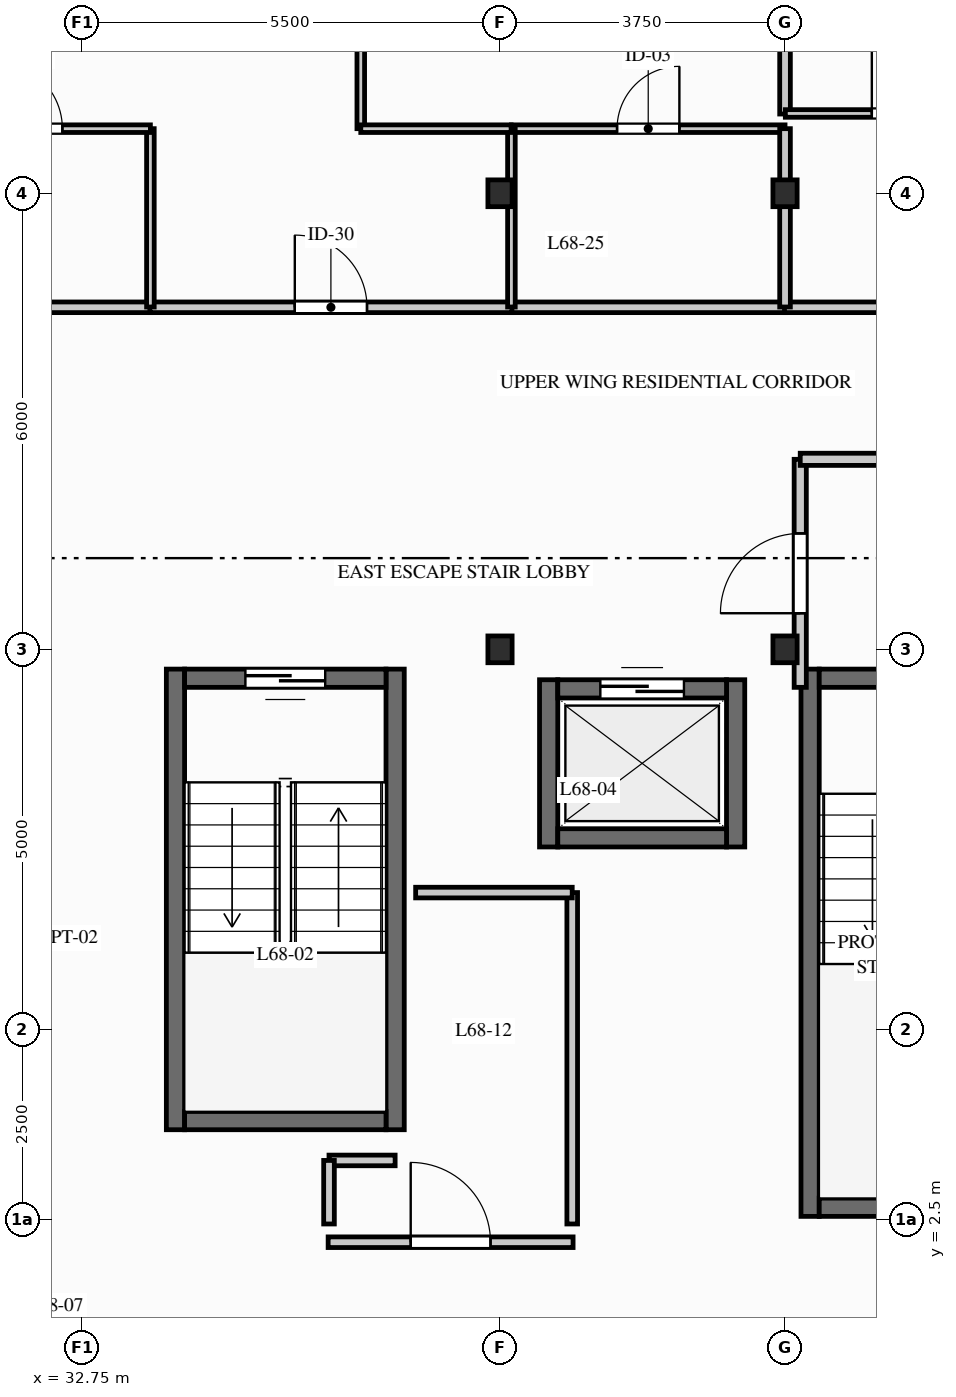
"""IFC4 building model, lengths in metres.
Left out: names, types, materials, properties, quantities, classifications, styles, units other than length and angle.
Written with IfcOpenShell. Run it as: python <this file> out.ifc"""

import sys

from ifc_helpers import new_model, si_unit, direction, frame, frame_2d, origin, origin_2d, place, context, subcontext, project, spatial, rectangle, i_section, extrude, element, fill, save


model = new_model("IFC4")
c1 = context("Model", 3, precision=1e-05, world=origin(), true_north=direction((0.0, 1.0)))
c2 = subcontext(c1, "Body", "Model", "MODEL_VIEW")
j1 = project(units=[si_unit("LENGTHUNIT", "METRE"), si_unit("PLANEANGLEUNIT", "RADIAN")], contexts=[c1])
p1 = place(None, origin())
s1 = spatial("IfcSite", under=j1, at=p1, CompositionType="ELEMENT")
p2 = place(p1, origin())
s2 = spatial("IfcBuilding", under=s1, at=p2, CompositionType="ELEMENT")
p3 = place(p2, frame((0.0, 0.0, 224.2)))
s3 = spatial("IfcBuildingStorey", under=s2, at=p3, CompositionType="ELEMENT", Elevation=224.2)
for number, where, z_axis, x_axis in (
    (1, (38.25, 10.0, 0.0), (0.0, 0.0, 1.0), (1.0, 0.0, 0.0)),
    (2, (38.25, 16.0, 0.0), (0.0, 0.0, 1.0), (1.0, 0.0, 0.0)),
    (3, (42.0, 10.0, 0.0), (0.0, 0.0, 1.0), (1.0, 0.0, 0.0)),
    (4, (42.0, 16.0, 0.0), (0.0, 0.0, 1.0), (1.0, 0.0, 0.0)),
):
    element("IfcColumn", number, at=place(p3, frame(where, z_axis=z_axis, x_axis=x_axis)), inside=s3, PredefinedType="COLUMN", context=c2, shape_type="SweptSolid", body=[
        extrude(i_section(OverallWidth=0.318, OverallDepth=0.353, WebThickness=0.023, FlangeThickness=0.038, FilletRadius=0.015, at=origin_2d()), origin(), (0.0, 0.0, 1.0), 3.1),
    ])
p4 = place(p3, frame((42.33, 2.54, 0.0), z_axis=(0.0, 0.0, 1.0), x_axis=(0.0, 1.0, 0.0)))
e5 = element("IfcWall", 5, at=p4, inside=s3, PredefinedType="SHEAR", context=c2, shape_type="SweptSolid", body=[
    extrude(rectangle(XDim=7.2, YDim=0.24, at=frame_2d((3.6, 0.0))), origin(), (0.0, 0.0, 1.0), 2.89),
])
p5 = place(p3, frame((42.45, 2.66, 0.0), z_axis=(0.0, 0.0, 1.0), x_axis=(1.0, 0.0, 0.0)))
e6 = element("IfcWall", 6, at=p5, inside=s3, PredefinedType="SHEAR", context=c2, shape_type="SweptSolid", body=[
    extrude(rectangle(XDim=2.95, YDim=0.24, at=frame_2d((1.475, 0.0))), origin(), (0.0, 0.0, 1.0), 2.89),
])
p6 = place(p3, frame((45.4, 9.62, 0.0), z_axis=(0.0, 0.0, 1.0), x_axis=(-1.0, 0.0, 0.0)))
e7 = element("IfcWall", 7, at=p6, inside=s3, PredefinedType="SHEAR", context=c2, shape_type="SweptSolid", body=[
    extrude(rectangle(XDim=2.95, YDim=0.24, at=frame_2d((1.475, 0.0))), origin(), (0.0, 0.0, 1.0), 2.89),
])
p7 = place(p6, frame((0.95, 0.0, 0.0)))
e8 = element("IfcOpeningElement", 8, at=p7, cuts=e7, PredefinedType="OPENING", context=c2, shape_type="SweptSolid", body=[
    extrude(rectangle(XDim=1.05, YDim=2.06, at=frame_2d((0.525, 1.03))), frame((0.0, 0.13, 0.0), z_axis=(0.0, -1.0, 0.0), x_axis=(1.0, 0.0, 0.0)), (0.0, 0.0, 1.0), 0.26),
])
for number, where, z_axis, x_axis in (
    (9, (33.98, 3.68, 0.0), (0.0, 0.0, 1.0), (0.0, 1.0, 0.0)),
    (10, (36.87, 3.68, 0.0), (0.0, 0.0, 1.0), (0.0, 1.0, 0.0)),
):
    element("IfcWall", number, at=place(p3, frame(where, z_axis=z_axis, x_axis=x_axis)), inside=s3, PredefinedType="SHEAR", context=c2, shape_type="SweptSolid", body=[
        extrude(rectangle(XDim=6.06, YDim=0.24, at=frame_2d((3.03, 0.0))), origin(), (0.0, 0.0, 1.0), 2.89),
    ])
p8 = place(p3, frame((34.1, 3.8, 0.0), z_axis=(0.0, 0.0, 1.0), x_axis=(1.0, 0.0, 0.0)))
e11 = element("IfcWall", 11, at=p8, inside=s3, PredefinedType="SHEAR", context=c2, shape_type="SweptSolid", body=[
    extrude(rectangle(XDim=2.65, YDim=0.24, at=frame_2d((1.325, 0.0))), origin(), (0.0, 0.0, 1.0), 2.89),
])
p9 = place(p3, frame((36.75, 9.62, 0.0), z_axis=(0.0, 0.0, 1.0), x_axis=(-1.0, 0.0, 0.0)))
e12 = element("IfcWall", 12, at=p9, inside=s3, PredefinedType="SHEAR", context=c2, shape_type="SweptSolid", body=[
    extrude(rectangle(XDim=2.65, YDim=0.24, at=frame_2d((1.325, 0.0))), origin(), (0.0, 0.0, 1.0), 2.89),
])
p10 = place(p9, frame((0.8, 0.0, 0.0)))
e13 = element("IfcOpeningElement", 13, at=p10, cuts=e12, PredefinedType="OPENING", context=c2, shape_type="SweptSolid", body=[
    extrude(rectangle(XDim=1.05, YDim=2.06, at=frame_2d((0.525, 1.03))), frame((0.0, 0.13, 0.0), z_axis=(0.0, -1.0, 0.0), x_axis=(1.0, 0.0, 0.0)), (0.0, 0.0, 1.0), 0.26),
])
for number, where, z_axis, x_axis in (
    (14, (38.89, 7.4, 0.0), (0.0, 0.0, 1.0), (0.0, 1.0, 0.0)),
    (15, (41.35, 7.4, 0.0), (0.0, 0.0, 1.0), (0.0, 1.0, 0.0)),
):
    element("IfcWall", number, at=place(p3, frame(where, z_axis=z_axis, x_axis=x_axis)), inside=s3, PredefinedType="SHEAR", context=c2, shape_type="SweptSolid", body=[
        extrude(rectangle(XDim=2.2, YDim=0.24, at=frame_2d((1.1, 0.0))), origin(), (0.0, 0.0, 1.0), 2.89),
    ])
p11 = place(p3, frame((39.01, 7.52, 0.0), z_axis=(0.0, 0.0, 1.0), x_axis=(1.0, 0.0, 0.0)))
e16 = element("IfcWall", 16, at=p11, inside=s3, PredefinedType="SHEAR", context=c2, shape_type="SweptSolid", body=[
    extrude(rectangle(XDim=2.22, YDim=0.24, at=frame_2d((1.11, 0.0))), origin(), (0.0, 0.0, 1.0), 2.89),
])
p12 = place(p3, frame((39.01, 9.48, 0.0), z_axis=(0.0, 0.0, 1.0), x_axis=(1.0, 0.0, 0.0)))
e17 = element("IfcWall", 17, at=p12, inside=s3, PredefinedType="SHEAR", context=c2, shape_type="SweptSolid", body=[
    extrude(rectangle(XDim=2.22, YDim=0.24, at=frame_2d((1.11, 0.0))), origin(), (0.0, 0.0, 1.0), 2.89),
])
p13 = place(p12, frame((0.56, 0.0, 0.0)))
e18 = element("IfcOpeningElement", 18, at=p13, cuts=e17, PredefinedType="OPENING", context=c2, shape_type="SweptSolid", body=[
    extrude(rectangle(XDim=1.1, YDim=2.06, at=frame_2d((0.55, 1.03))), frame((0.0, 0.13, 0.0), z_axis=(0.0, -1.0, 0.0), x_axis=(1.0, 0.0, 0.0)), (0.0, 0.0, 1.0), 0.26),
])
p14 = place(p3, frame((35.989, 2.2, 0.0), z_axis=(0.0, 0.0, 1.0), x_axis=(1.0, 0.0, 0.0)))
e19 = element("IfcWall", 19, at=p14, inside=s3, PredefinedType="PARTITIONING", context=c2, shape_type="SweptSolid", body=[
    extrude(rectangle(XDim=3.222, YDim=0.14, at=frame_2d((1.611, 0.0))), origin(), (0.0, 0.0, 1.0), 2.325),
])
p15 = place(p14, frame((1.086, 0.0, 0.0)))
e20 = element("IfcOpeningElement", 20, at=p15, cuts=e19, PredefinedType="OPENING", context=c2, shape_type="SweptSolid", body=[
    extrude(rectangle(XDim=1.05, YDim=2.06, at=frame_2d((0.525, 1.03))), frame((0.0, 0.08, 0.0), z_axis=(0.0, -1.0, 0.0), x_axis=(1.0, 0.0, 0.0)), (0.0, 0.0, 1.0), 0.16),
])
p16 = place(p3, frame((42.2, 9.5, 0.0), z_axis=(0.0, 0.0, 1.0), x_axis=(0.0, 1.0, 0.0)))
e21 = element("IfcWall", 21, at=p16, inside=s3, PredefinedType="PARTITIONING", context=c2, shape_type="SweptSolid", body=[
    extrude(rectangle(XDim=3.0, YDim=0.16, at=frame_2d((1.5, 0.0))), origin(), (0.0, 0.0, 1.0), 2.325),
])
p17 = place(p16, frame((0.975, 0.0, 0.0)))
e22 = element("IfcOpeningElement", 22, at=p17, cuts=e21, PredefinedType="OPENING", context=c2, shape_type="SweptSolid", body=[
    extrude(rectangle(XDim=1.05, YDim=2.06, at=frame_2d((0.525, 1.03))), frame((0.0, 0.09, 0.0), z_axis=(0.0, -1.0, 0.0), x_axis=(1.0, 0.0, 0.0)), (0.0, 0.0, 1.0), 0.18),
])
p18 = place(p3, frame((42.2, 12.5, 0.0), z_axis=(0.0, 0.0, 1.0), x_axis=(1.0, 0.0, 0.0)))
e23 = element("IfcWall", 23, at=p18, inside=s3, PredefinedType="PARTITIONING", context=c2, shape_type="SweptSolid", body=[
    extrude(rectangle(XDim=5.8, YDim=0.16, at=frame_2d((2.9, 0.0))), origin(), (0.0, 0.0, 1.0), 2.325),
])
p19 = place(p18, frame((2.375, 0.0, 0.0)))
e24 = element("IfcOpeningElement", 24, at=p19, cuts=e23, PredefinedType="OPENING", context=c2, shape_type="SweptSolid", body=[
    extrude(rectangle(XDim=1.05, YDim=2.06, at=frame_2d((0.525, 1.03))), frame((0.0, 0.09, 0.0), z_axis=(0.0, -1.0, 0.0), x_axis=(1.0, 0.0, 0.0)), (0.0, 0.0, 1.0), 0.18),
])
p20 = place(p3, frame((30.443, 14.5, 0.0), z_axis=(0.0, 0.0, 1.0), x_axis=(1.0, 0.0, 0.0)))
e25 = element("IfcWall", 25, at=p20, inside=s3, PredefinedType="PARTITIONING", context=c2, shape_type="SweptSolid", body=[
    extrude(rectangle(XDim=3.219, YDim=0.14, at=frame_2d((1.609, 0.0))), origin(), (0.0, 0.0, 1.0), 2.89),
])
p21 = place(p3, frame((38.389, 14.5, 0.0), z_axis=(0.0, 0.0, 1.0), x_axis=(1.0, 0.0, 0.0)))
e26 = element("IfcWall", 26, at=p21, inside=s3, PredefinedType="PARTITIONING", context=c2, shape_type="SweptSolid", body=[
    extrude(rectangle(XDim=3.623, YDim=0.14, at=frame_2d((1.811, 0.0))), origin(), (0.0, 0.0, 1.0), 2.325),
])
p22 = place(p3, frame((33.643, 14.5, 0.0), z_axis=(0.0, 0.0, 1.0), x_axis=(1.0, 0.0, 0.0)))
e27 = element("IfcWall", 27, at=p22, inside=s3, PredefinedType="PARTITIONING", context=c2, shape_type="SweptSolid", body=[
    extrude(rectangle(XDim=4.765, YDim=0.14, at=frame_2d((2.382, 0.0))), origin(), (0.0, 0.0, 1.0), 2.325),
])
p23 = place(p22, frame((1.907, 0.0, 0.0)))
e28 = element("IfcOpeningElement", 28, at=p23, cuts=e27, PredefinedType="OPENING", context=c2, shape_type="SweptSolid", body=[
    extrude(rectangle(XDim=0.95, YDim=2.05, at=frame_2d((0.475, 1.025))), frame((0.0, 0.08, 0.0), z_axis=(0.0, -1.0, 0.0), x_axis=(1.0, 0.0, 0.0)), (0.0, 0.0, 1.0), 0.16),
])
p24 = place(p3, frame((41.993, 14.5, 0.0), z_axis=(0.0, 0.0, 1.0), x_axis=(1.0, 0.0, 0.0)))
e29 = element("IfcWall", 29, at=p24, inside=s3, PredefinedType="PARTITIONING", context=c2, shape_type="SweptSolid", body=[
    extrude(rectangle(XDim=3.119, YDim=0.14, at=frame_2d((1.559, 0.0))), origin(), (0.0, 0.0, 1.0), 2.325),
])
p25 = place(p3, frame((33.65, 14.504, 0.0), z_axis=(0.0, 0.0, 1.0), x_axis=(0.0, 1.0, 0.0)))
e30 = element("IfcWall", 30, at=p25, inside=s3, PredefinedType="PARTITIONING", context=c2, shape_type="SweptSolid", body=[
    extrude(rectangle(XDim=2.346, YDim=0.1, at=frame_2d((1.173, 0.0))), origin(), (0.0, 0.0, 1.0), 2.325),
])
p26 = place(p3, frame((30.454, 16.85, 0.0), z_axis=(0.0, 0.0, 1.0), x_axis=(1.0, 0.0, 0.0)))
e31 = element("IfcWall", 31, at=p26, inside=s3, PredefinedType="PARTITIONING", context=c2, shape_type="SweptSolid", body=[
    extrude(rectangle(XDim=3.196, YDim=0.1, at=frame_2d((1.598, 0.0))), origin(), (0.0, 0.0, 1.0), 2.89),
])
p27 = place(p26, frame((1.158, 0.0, 0.0)))
e32 = element("IfcOpeningElement", 32, at=p27, cuts=e31, PredefinedType="OPENING", context=c2, shape_type="SweptSolid", body=[
    extrude(rectangle(XDim=0.88, YDim=2.04, at=frame_2d((0.44, 1.02))), frame((0.0, 0.06, 0.0), z_axis=(0.0, -1.0, 0.0), x_axis=(1.0, 0.0, 0.0)), (0.0, 0.0, 1.0), 0.12),
])
p28 = place(p3, frame((38.4, 16.85, 0.0), z_axis=(0.0, 0.0, 1.0), x_axis=(1.0, 0.0, 0.0)))
e33 = element("IfcWall", 33, at=p28, inside=s3, PredefinedType="PARTITIONING", context=c2, shape_type="SweptSolid", body=[
    extrude(rectangle(XDim=3.6, YDim=0.1, at=frame_2d((1.8, 0.0))), origin(), (0.0, 0.0, 1.0), 2.325),
])
p29 = place(p28, frame((1.39, 0.0, 0.0)))
e34 = element("IfcOpeningElement", 34, at=p29, cuts=e33, PredefinedType="OPENING", context=c2, shape_type="SweptSolid", body=[
    extrude(rectangle(XDim=0.82, YDim=2.02, at=frame_2d((0.41, 1.01))), frame((0.0, 0.06, 0.0), z_axis=(0.0, -1.0, 0.0), x_axis=(1.0, 0.0, 0.0)), (0.0, 0.0, 1.0), 0.12),
])
p30 = place(p3, frame((38.4, 14.504, 0.0), z_axis=(0.0, 0.0, 1.0), x_axis=(0.0, 1.0, 0.0)))
e35 = element("IfcWall", 35, at=p30, inside=s3, PredefinedType="PARTITIONING", context=c2, shape_type="SweptSolid", body=[
    extrude(rectangle(XDim=2.346, YDim=0.1, at=frame_2d((1.173, 0.0))), origin(), (0.0, 0.0, 1.0), 2.325),
])
p31 = place(p3, frame((42.0, 14.504, 0.0), z_axis=(0.0, 0.0, 1.0), x_axis=(0.0, 1.0, 0.0)))
e36 = element("IfcWall", 36, at=p31, inside=s3, PredefinedType="PARTITIONING", context=c2, shape_type="SweptSolid", body=[
    extrude(rectangle(XDim=2.346, YDim=0.14, at=frame_2d((1.173, 0.0))), origin(), (0.0, 0.0, 1.0), 2.325),
])
p32 = place(p3, frame((36.418, 16.85, 0.0), z_axis=(0.0, 0.0, 1.0), x_axis=(0.0, 1.0, 0.0)))
e37 = element("IfcWall", 37, at=p32, inside=s3, PredefinedType="PARTITIONING", context=c2, shape_type="SweptSolid", body=[
    extrude(rectangle(XDim=4.896, YDim=0.1, at=frame_2d((2.448, 0.0))), origin(), (0.0, 0.0, 1.0), 2.614),
])
p33 = place(p32, frame((2.008, 0.0, 0.0)))
e38 = element("IfcOpeningElement", 38, at=p33, cuts=e37, PredefinedType="OPENING", context=c2, shape_type="SweptSolid", body=[
    extrude(rectangle(XDim=0.88, YDim=2.04, at=frame_2d((0.44, 1.02))), frame((0.0, 0.06, 0.0), z_axis=(0.0, -1.0, 0.0), x_axis=(1.0, 0.0, 0.0)), (0.0, 0.0, 1.0), 0.12),
])
p34 = place(p3, frame((36.418, 16.85, 0.0), z_axis=(0.0, 0.0, 1.0), x_axis=(1.0, 0.0, 0.0)))
e39 = element("IfcWall", 39, at=p34, inside=s3, PredefinedType="PARTITIONING", context=c2, shape_type="SweptSolid", body=[
    extrude(rectangle(XDim=1.978, YDim=0.1, at=frame_2d((0.989, 0.0))), origin(), (0.0, 0.0, 1.0), 2.325),
])
p35 = place(p3, frame((42.0, 17.043, 0.0), z_axis=(0.0, 0.0, 1.0), x_axis=(0.0, 1.0, 0.0)))
e40 = element("IfcWall", 40, at=p35, inside=s3, PredefinedType="PARTITIONING", context=c2, shape_type="SweptSolid", body=[
    extrude(rectangle(XDim=6.615, YDim=0.14, at=frame_2d((3.307, 0.0))), origin(), (0.0, 0.0, 1.0), 2.325),
])
p36 = place(p3, frame((42.004, 17.05, 0.0), z_axis=(0.0, 0.0, 1.0), x_axis=(1.0, 0.0, 0.0)))
e41 = element("IfcWall", 41, at=p36, inside=s3, PredefinedType="PARTITIONING", context=c2, shape_type="SweptSolid", body=[
    extrude(rectangle(XDim=3.096, YDim=0.1, at=frame_2d((1.548, 0.0))), origin(), (0.0, 0.0, 1.0), 2.325),
])
p37 = place(p36, frame((1.138, 0.0, 0.0)))
e42 = element("IfcOpeningElement", 42, at=p37, cuts=e41, PredefinedType="OPENING", context=c2, shape_type="SweptSolid", body=[
    extrude(rectangle(XDim=0.82, YDim=2.02, at=frame_2d((0.41, 1.01))), frame((0.0, 0.06, 0.0), z_axis=(0.0, -1.0, 0.0), x_axis=(1.0, 0.0, 0.0)), (0.0, 0.0, 1.0), 0.12),
])
p38 = place(p3, frame((39.2, 2.44, 0.0), z_axis=(0.0, 0.0, 1.0), x_axis=(0.0, 1.0, 0.0)))
e43 = element("IfcWall", 43, at=p38, inside=s3, PredefinedType="PARTITIONING", context=c2, shape_type="SweptSolid", body=[
    extrude(rectangle(XDim=4.36, YDim=0.14, at=frame_2d((2.18, 0.0))), origin(), (0.0, 0.0, 1.0), 2.89),
])
p39 = place(p3, frame((37.14, 6.8, 0.0), z_axis=(0.0, 0.0, 1.0), x_axis=(1.0, 0.0, 0.0)))
e44 = element("IfcWall", 44, at=p39, inside=s3, PredefinedType="PARTITIONING", context=c2, shape_type="SweptSolid", body=[
    extrude(rectangle(XDim=2.06, YDim=0.14, at=frame_2d((1.03, 0.0))), origin(), (0.0, 0.0, 1.0), 2.325),
])
p40 = place(p3, frame((36.0, 3.276, 0.0), z_axis=(0.0, 0.0, 1.0), x_axis=(1.0, 0.0, 0.0)))
e45 = element("IfcWall", 45, at=p40, inside=s3, PredefinedType="PARTITIONING", context=c2, shape_type="SweptSolid", body=[
    extrude(rectangle(XDim=0.87, YDim=0.14, at=frame_2d((0.435, 0.0))), origin(), (0.0, 0.0, 1.0), 2.89),
])
p41 = place(p3, frame((36.0, 2.44, 0.0), z_axis=(0.0, 0.0, 1.0), x_axis=(0.0, 1.0, 0.0)))
e46 = element("IfcWall", 46, at=p41, inside=s3, PredefinedType="PARTITIONING", context=c2, shape_type="SweptSolid", body=[
    extrude(rectangle(XDim=0.836, YDim=0.14, at=frame_2d((0.418, 0.0))), origin(), (0.0, 0.0, 1.0), 2.89),
])
p42 = place(p10, origin())
e47 = element("IfcDoor", 47, at=p42, inside=s3, OperationType="SINGLE_SWING_LEFT", PredefinedType="DOOR", context=c2, shape_type="SweptSolid", body=[
    extrude(rectangle(XDim=1.05, YDim=2.06, at=frame_2d((0.525, 1.03))), frame((0.0, 0.025, 0.0), z_axis=(0.0, -1.0, 0.0), x_axis=(1.0, 0.0, 0.0)), (0.0, 0.0, 1.0), 0.05),
])
fill(e13, e47)
p43 = place(p13, origin())
e48 = element("IfcDoor", 48, at=p43, inside=s3, OperationType="SLIDING_TO_RIGHT", PredefinedType="DOOR", context=c2, shape_type="SweptSolid", body=[
    extrude(rectangle(XDim=1.1, YDim=2.06, at=frame_2d((0.55, 1.03))), frame((0.0, 0.025, 0.0), z_axis=(0.0, -1.0, 0.0), x_axis=(1.0, 0.0, 0.0)), (0.0, 0.0, 1.0), 0.05),
])
fill(e18, e48)
p44 = place(p15, origin())
e49 = element("IfcDoor", 49, at=p44, inside=s3, OperationType="SINGLE_SWING_LEFT", PredefinedType="DOOR", context=c2, shape_type="SweptSolid", body=[
    extrude(rectangle(XDim=1.05, YDim=2.06, at=frame_2d((0.525, 1.03))), frame((0.0, 0.025, 0.0), z_axis=(0.0, -1.0, 0.0), x_axis=(1.0, 0.0, 0.0)), (0.0, 0.0, 1.0), 0.05),
])
fill(e20, e49)
p45 = place(p17, origin())
e50 = element("IfcDoor", 50, at=p45, inside=s3, OperationType="SINGLE_SWING_LEFT", PredefinedType="DOOR", context=c2, shape_type="SweptSolid", body=[
    extrude(rectangle(XDim=1.05, YDim=2.06, at=frame_2d((0.525, 1.03))), frame((0.0, 0.025, 0.0), z_axis=(0.0, -1.0, 0.0), x_axis=(1.0, 0.0, 0.0)), (0.0, 0.0, 1.0), 0.05),
])
fill(e22, e50)
p46 = place(p23, origin())
e51 = element("IfcDoor", 51, at=p46, inside=s3, OperationType="SINGLE_SWING_LEFT", PredefinedType="DOOR", context=c2, shape_type="SweptSolid", body=[
    extrude(rectangle(XDim=0.95, YDim=2.05, at=frame_2d((0.475, 1.025))), frame((0.0, 0.025, 0.0), z_axis=(0.0, -1.0, 0.0), x_axis=(1.0, 0.0, 0.0)), (0.0, 0.0, 1.0), 0.05),
])
fill(e28, e51)
p47 = place(p27, origin())
e52 = element("IfcDoor", 52, at=p47, inside=s3, OperationType="SINGLE_SWING_LEFT", PredefinedType="DOOR", context=c2, shape_type="SweptSolid", body=[
    extrude(rectangle(XDim=0.88, YDim=2.04, at=frame_2d((0.44, 1.02))), frame((0.0, 0.025, 0.0), z_axis=(0.0, -1.0, 0.0), x_axis=(1.0, 0.0, 0.0)), (0.0, 0.0, 1.0), 0.05),
])
fill(e32, e52)
p48 = place(p37, origin())
e53 = element("IfcDoor", 53, at=p48, inside=s3, OperationType="SINGLE_SWING_LEFT", PredefinedType="DOOR", context=c2, shape_type="SweptSolid", body=[
    extrude(rectangle(XDim=0.82, YDim=2.02, at=frame_2d((0.41, 1.01))), frame((0.0, 0.025, 0.0), z_axis=(0.0, -1.0, 0.0), x_axis=(1.0, 0.0, 0.0)), (0.0, 0.0, 1.0), 0.05),
])
fill(e42, e53)
p49 = place(p29, origin())
e54 = element("IfcDoor", 54, at=p49, inside=s3, OperationType="SINGLE_SWING_RIGHT", PredefinedType="DOOR", context=c2, shape_type="SweptSolid", body=[
    extrude(rectangle(XDim=0.82, YDim=2.02, at=frame_2d((0.41, 1.01))), frame((0.0, 0.025, 0.0), z_axis=(0.0, -1.0, 0.0), x_axis=(1.0, 0.0, 0.0)), (0.0, 0.0, 1.0), 0.05),
])
fill(e34, e54)
save(model, sys.argv[1])
